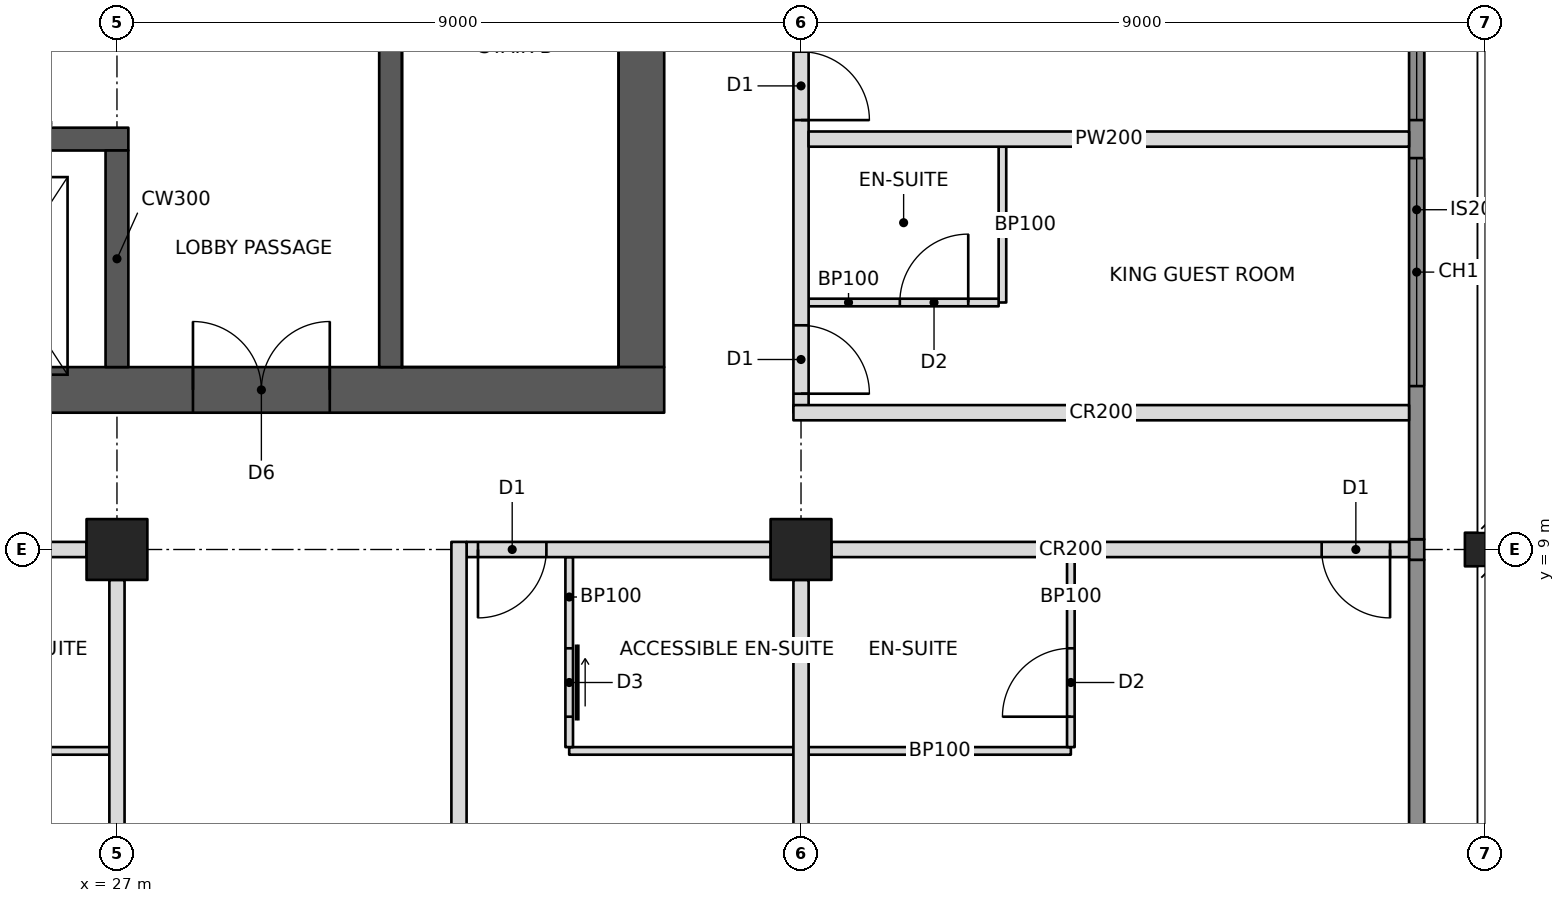
"""IFC4 building model, lengths in metres.
Left out: names, types, materials, properties, quantities, classifications, styles, units other than length and angle.
Written with IfcOpenShell. Run it as: python <this file> out.ifc"""

import sys

from ifc_helpers import new_model, si_unit, direction, frame, frame_2d, origin, origin_2d, place, context, subcontext, project, spatial, rectangle, hollow_rectangle, i_section, extrude, element, fill, save


model = new_model("IFC4")
c1 = context("Model", 3, precision=1e-05, world=origin(), true_north=direction((0.0, 1.0)))
c2 = subcontext(c1, "Body", "Model", "MODEL_VIEW")
j1 = project(units=[si_unit("LENGTHUNIT", "METRE"), si_unit("PLANEANGLEUNIT", "RADIAN")], contexts=[c1])
p1 = place(None, origin())
s1 = spatial("IfcSite", under=j1, at=p1, CompositionType="ELEMENT")
p2 = place(p1, origin())
s2 = spatial("IfcBuilding", under=s1, at=p2, CompositionType="ELEMENT")
p3 = place(p2, frame((0.0, 0.0, 124.8)))
s3 = spatial("IfcBuildingStorey", under=s2, at=p3, CompositionType="ELEMENT", Elevation=124.8)
for number, where, z_axis, x_axis in (
    (1, (27.0, 9.0, 0.0), (0.0, 0.0, 1.0), (1.0, 0.0, 0.0)),
    (2, (36.0, 9.0, 0.0), (0.0, 0.0, 1.0), (0.0, 1.0, 0.0)),
):
    element("IfcColumn", number, at=place(p3, frame(where, z_axis=z_axis, x_axis=x_axis)), inside=s3, PredefinedType="COLUMN", context=c2, shape_type="SweptSolid", body=[
        extrude(hollow_rectangle(XDim=0.8, YDim=0.8, WallThickness=0.07, at=origin_2d()), origin(), (0.0, 0.0, 1.0), 3.4),
    ])
p4 = place(p3, frame((45.0, 9.0, 0.0), z_axis=(0.0, 0.0, 1.0), x_axis=(0.0, 1.0, 0.0)))
e3 = element("IfcColumn", 3, at=p4, inside=s3, PredefinedType="COLUMN", context=c2, shape_type="SweptSolid", body=[
    extrude(i_section(OverallWidth=0.442, OverallDepth=0.531, WebThickness=0.066, FlangeThickness=0.106, at=origin_2d()), origin(), (0.0, 0.0, 1.0), 3.4),
])
p5 = place(p3, frame((10.8, 11.1, 0.0), z_axis=(0.0, 0.0, 1.0), x_axis=(1.0, 0.0, 0.0)))
e4 = element("IfcWall", 4, at=p5, inside=s3, PredefinedType="SHEAR", context=c2, shape_type="SweptSolid", body=[
    extrude(rectangle(XDim=23.4, YDim=0.6, at=frame_2d((11.7, 0.0))), origin(), (0.0, 0.0, 1.0), 3.4),
])
p6 = place(p5, frame((1.0, 0.0, 0.0)))
e5 = element("IfcOpeningElement", 5, at=p6, cuts=e4, PredefinedType="OPENING", context=c2, shape_type="SweptSolid", body=[
    extrude(rectangle(XDim=1.0, YDim=2.1, at=frame_2d((0.5, 1.05))), frame((0.0, 0.31, 0.0), z_axis=(0.0, -1.0, 0.0), x_axis=(1.0, 0.0, 0.0)), (0.0, 0.0, 1.0), 0.62),
])
p7 = place(p5, frame((17.2, 0.0, 0.0)))
e6 = element("IfcOpeningElement", 6, at=p7, cuts=e4, PredefinedType="OPENING", context=c2, shape_type="SweptSolid", body=[
    extrude(rectangle(XDim=1.8, YDim=2.1, at=frame_2d((0.9, 1.05))), frame((0.0, 0.31, 0.0), z_axis=(0.0, -1.0, 0.0), x_axis=(1.0, 0.0, 0.0)), (0.0, 0.0, 1.0), 0.62),
])
p8 = place(p3, frame((33.9, 11.4, 0.0), z_axis=(0.0, 0.0, 1.0), x_axis=(0.0, 1.0, 0.0)))
e7 = element("IfcWall", 7, at=p8, inside=s3, PredefinedType="SHEAR", context=c2, shape_type="SweptSolid", body=[
    extrude(rectangle(XDim=13.2, YDim=0.6, at=frame_2d((6.6, 0.0))), origin(), (0.0, 0.0, 1.0), 3.4),
])
p9 = place(p3, frame((18.15, 14.4, 0.0), z_axis=(0.0, 0.0, 1.0), x_axis=(1.0, 0.0, 0.0)))
e8 = element("IfcWall", 8, at=p9, inside=s3, PredefinedType="SHEAR", context=c2, shape_type="SweptSolid", body=[
    extrude(rectangle(XDim=9.0, YDim=0.3, at=frame_2d((4.5, 0.0))), origin(), (0.0, 0.0, 1.0), 3.4),
])
p10 = place(p9, frame((0.8, 0.0, 0.0)))
e9 = element("IfcOpeningElement", 9, at=p10, cuts=e8, PredefinedType="OPENING", context=c2, shape_type="SweptSolid", body=[
    extrude(rectangle(XDim=1.1, YDim=2.1, at=frame_2d((0.55, 1.05))), frame((0.0, 0.16, 0.0), z_axis=(0.0, -1.0, 0.0), x_axis=(1.0, 0.0, 0.0)), (0.0, 0.0, 1.0), 0.32),
])
p11 = place(p9, frame((3.8, 0.0, 0.0)))
e10 = element("IfcOpeningElement", 10, at=p11, cuts=e8, PredefinedType="OPENING", context=c2, shape_type="SweptSolid", body=[
    extrude(rectangle(XDim=1.1, YDim=2.1, at=frame_2d((0.55, 1.05))), frame((0.0, 0.16, 0.0), z_axis=(0.0, -1.0, 0.0), x_axis=(1.0, 0.0, 0.0)), (0.0, 0.0, 1.0), 0.32),
])
p12 = place(p9, frame((6.75, 0.0, 0.0)))
e11 = element("IfcOpeningElement", 11, at=p12, cuts=e8, PredefinedType="OPENING", context=c2, shape_type="SweptSolid", body=[
    extrude(rectangle(XDim=1.2, YDim=2.1, at=frame_2d((0.6, 1.05))), frame((0.0, 0.16, 0.0), z_axis=(0.0, -1.0, 0.0), x_axis=(1.0, 0.0, 0.0)), (0.0, 0.0, 1.0), 0.32),
])
p13 = place(p3, frame((27.0, 11.4, 0.0), z_axis=(0.0, 0.0, 1.0), x_axis=(0.0, 1.0, 0.0)))
e12 = element("IfcWall", 12, at=p13, inside=s3, PredefinedType="SHEAR", context=c2, shape_type="SweptSolid", body=[
    extrude(rectangle(XDim=2.85, YDim=0.3, at=frame_2d((1.425, 0.0))), origin(), (0.0, 0.0, 1.0), 3.4),
])
p14 = place(p3, frame((30.6, 11.4, 0.0), z_axis=(0.0, 0.0, 1.0), x_axis=(0.0, 1.0, 0.0)))
e13 = element("IfcWall", 13, at=p14, inside=s3, PredefinedType="SHEAR", context=c2, shape_type="SweptSolid", body=[
    extrude(rectangle(XDim=13.2, YDim=0.3, at=frame_2d((6.6, 0.0))), origin(), (0.0, 0.0, 1.0), 3.4),
])
p15 = place(p3, frame((18.4, 9.0, 0.0), z_axis=(0.0, 0.0, 1.0), x_axis=(1.0, 0.0, 0.0)))
e14 = element("IfcWall", 14, at=p15, inside=s3, PredefinedType="PARTITIONING", context=c2, shape_type="SweptSolid", body=[
    extrude(rectangle(XDim=8.2, YDim=0.2, at=frame_2d((4.1, 0.0))), origin(), (0.0, 0.0, 1.0), 2.405),
])
p16 = place(p15, frame((4.35, 0.0, 0.0)))
e15 = element("IfcOpeningElement", 15, at=p16, cuts=e14, PredefinedType="OPENING", context=c2, shape_type="SweptSolid", body=[
    extrude(rectangle(XDim=0.9, YDim=2.1, at=frame_2d((0.45, 1.05))), frame((0.0, 0.11, 0.0), z_axis=(0.0, -1.0, 0.0), x_axis=(1.0, 0.0, 0.0)), (0.0, 0.0, 1.0), 0.22),
])
p17 = place(p3, frame((31.6, 9.0, 0.0), z_axis=(0.0, 0.0, 1.0), x_axis=(1.0, 0.0, 0.0)))
e16 = element("IfcWall", 16, at=p17, inside=s3, PredefinedType="PARTITIONING", context=c2, shape_type="SweptSolid", body=[
    extrude(rectangle(XDim=4.0, YDim=0.2, at=frame_2d((2.0, 0.0))), origin(), (0.0, 0.0, 1.0), 2.405),
])
p18 = place(p17, frame((0.15, 0.0, 0.0)))
e17 = element("IfcOpeningElement", 17, at=p18, cuts=e16, PredefinedType="OPENING", context=c2, shape_type="SweptSolid", body=[
    extrude(rectangle(XDim=0.9, YDim=2.1, at=frame_2d((0.45, 1.05))), frame((0.0, 0.11, 0.0), z_axis=(0.0, -1.0, 0.0), x_axis=(1.0, 0.0, 0.0)), (0.0, 0.0, 1.0), 0.22),
])
p19 = place(p3, frame((36.4, 9.0, 0.0), z_axis=(0.0, 0.0, 1.0), x_axis=(1.0, 0.0, 0.0)))
e18 = element("IfcWall", 18, at=p19, inside=s3, PredefinedType="PARTITIONING", context=c2, shape_type="SweptSolid", body=[
    extrude(rectangle(XDim=7.6, YDim=0.2, at=frame_2d((3.8, 0.0))), origin(), (0.0, 0.0, 1.0), 2.438),
])
p20 = place(p19, frame((6.45, 0.0, 0.0)))
e19 = element("IfcOpeningElement", 19, at=p20, cuts=e18, PredefinedType="OPENING", context=c2, shape_type="SweptSolid", body=[
    extrude(rectangle(XDim=0.9, YDim=2.1, at=frame_2d((0.45, 1.05))), frame((0.0, 0.11, 0.0), z_axis=(0.0, -1.0, 0.0), x_axis=(1.0, 0.0, 0.0)), (0.0, 0.0, 1.0), 0.22),
])
p21 = place(p3, frame((36.0, 10.8, 0.0), z_axis=(0.0, 0.0, 1.0), x_axis=(0.0, 1.0, 0.0)))
e20 = element("IfcWall", 20, at=p21, inside=s3, PredefinedType="PARTITIONING", context=c2, shape_type="SweptSolid", body=[
    extrude(rectangle(XDim=6.8, YDim=0.2, at=frame_2d((3.4, 0.0))), origin(), (0.0, 0.0, 1.0), 2.405),
])
p22 = place(p21, frame((0.25, 0.0, 0.0)))
e21 = element("IfcOpeningElement", 21, at=p22, cuts=e20, PredefinedType="OPENING", context=c2, shape_type="SweptSolid", body=[
    extrude(rectangle(XDim=0.9, YDim=2.1, at=frame_2d((0.45, 1.05))), frame((0.0, 0.11, 0.0), z_axis=(0.0, -1.0, 0.0), x_axis=(1.0, 0.0, 0.0)), (0.0, 0.0, 1.0), 0.22),
])
p23 = place(p21, frame((3.85, 0.0, 0.0)))
e22 = element("IfcOpeningElement", 22, at=p23, cuts=e20, PredefinedType="OPENING", context=c2, shape_type="SweptSolid", body=[
    extrude(rectangle(XDim=0.9, YDim=2.1, at=frame_2d((0.45, 1.05))), frame((0.0, 0.11, 0.0), z_axis=(0.0, -1.0, 0.0), x_axis=(1.0, 0.0, 0.0)), (0.0, 0.0, 1.0), 0.22),
])
p24 = place(p3, frame((35.9, 10.8, 0.0), z_axis=(0.0, 0.0, 1.0), x_axis=(1.0, 0.0, 0.0)))
e23 = element("IfcWall", 23, at=p24, inside=s3, PredefinedType="PARTITIONING", context=c2, shape_type="SweptSolid", body=[
    extrude(rectangle(XDim=8.1, YDim=0.2, at=frame_2d((4.05, 0.0))), origin(), (0.0, 0.0, 1.0), 2.404),
])
p25 = place(p3, frame((27.0, 8.6, 0.0), z_axis=(0.0, 0.0, 1.0), x_axis=(0.0, -1.0, 0.0)))
e24 = element("IfcWall", 24, at=p25, inside=s3, PredefinedType="PARTITIONING", context=c2, shape_type="SweptSolid", body=[
    extrude(rectangle(XDim=7.6, YDim=0.2, at=frame_2d((3.8, 0.0))), origin(), (0.0, 0.0, 1.0), 2.405),
])
p26 = place(p3, frame((31.5, 9.1, 0.0), z_axis=(0.0, 0.0, 1.0), x_axis=(0.0, -1.0, 0.0)))
e25 = element("IfcWall", 25, at=p26, inside=s3, PredefinedType="PARTITIONING", context=c2, shape_type="SweptSolid", body=[
    extrude(rectangle(XDim=8.1, YDim=0.2, at=frame_2d((4.05, 0.0))), origin(), (0.0, 0.0, 1.0), 2.404),
])
p27 = place(p3, frame((36.0, 8.6, 0.0), z_axis=(0.0, 0.0, 1.0), x_axis=(0.0, -1.0, 0.0)))
e26 = element("IfcWall", 26, at=p27, inside=s3, PredefinedType="PARTITIONING", context=c2, shape_type="SweptSolid", body=[
    extrude(rectangle(XDim=7.6, YDim=0.2, at=frame_2d((3.8, 0.0))), origin(), (0.0, 0.0, 1.0), 2.438),
])
p28 = place(p3, frame((23.95, 6.35, 0.0), z_axis=(0.0, 0.0, 1.0), x_axis=(1.0, 0.0, 0.0)))
e27 = element("IfcWall", 27, at=p28, inside=s3, PredefinedType="PARTITIONING", context=c2, shape_type="SweptSolid", body=[
    extrude(rectangle(XDim=2.95, YDim=0.1, at=frame_2d((1.475, 0.0))), origin(), (0.0, 0.0, 1.0), 2.404),
])
p29 = place(p3, frame((32.95, 6.35, 0.0), z_axis=(0.0, 0.0, 1.0), x_axis=(1.0, 0.0, 0.0)))
e28 = element("IfcWall", 28, at=p29, inside=s3, PredefinedType="PARTITIONING", context=c2, shape_type="SweptSolid", body=[
    extrude(rectangle(XDim=2.95, YDim=0.1, at=frame_2d((1.475, 0.0))), origin(), (0.0, 0.0, 1.0), 2.438),
])
p30 = place(p3, frame((32.95, 8.9, 0.0), z_axis=(0.0, 0.0, 1.0), x_axis=(0.0, -1.0, 0.0)))
e29 = element("IfcWall", 29, at=p30, inside=s3, PredefinedType="PARTITIONING", context=c2, shape_type="SweptSolid", body=[
    extrude(rectangle(XDim=2.5, YDim=0.1, at=frame_2d((1.25, 0.0))), origin(), (0.0, 0.0, 1.0), 2.404),
])
p31 = place(p30, frame((1.2, 0.0, 0.0)))
e30 = element("IfcOpeningElement", 30, at=p31, cuts=e29, PredefinedType="OPENING", context=c2, shape_type="SweptSolid", body=[
    extrude(rectangle(XDim=0.9, YDim=2.1, at=frame_2d((0.45, 1.05))), frame((0.0, 0.06, 0.0), z_axis=(0.0, -1.0, 0.0), x_axis=(1.0, 0.0, 0.0)), (0.0, 0.0, 1.0), 0.12),
])
p32 = place(p3, frame((36.1, 6.35, 0.0), z_axis=(0.0, 0.0, 1.0), x_axis=(1.0, 0.0, 0.0)))
e31 = element("IfcWall", 31, at=p32, inside=s3, PredefinedType="PARTITIONING", context=c2, shape_type="SweptSolid", body=[
    extrude(rectangle(XDim=3.45, YDim=0.1, at=frame_2d((1.725, 0.0))), origin(), (0.0, 0.0, 1.0), 2.438),
])
p33 = place(p3, frame((39.55, 8.9, 0.0), z_axis=(0.0, 0.0, 1.0), x_axis=(0.0, -1.0, 0.0)))
e32 = element("IfcWall", 32, at=p33, inside=s3, PredefinedType="PARTITIONING", context=c2, shape_type="SweptSolid", body=[
    extrude(rectangle(XDim=2.5, YDim=0.1, at=frame_2d((1.25, 0.0))), origin(), (0.0, 0.0, 1.0), 2.438),
])
p34 = place(p33, frame((1.2, 0.0, 0.0)))
e33 = element("IfcOpeningElement", 33, at=p34, cuts=e32, PredefinedType="OPENING", context=c2, shape_type="SweptSolid", body=[
    extrude(rectangle(XDim=0.9, YDim=2.1, at=frame_2d((0.45, 1.05))), frame((0.0, 0.06, 0.0), z_axis=(0.0, -1.0, 0.0), x_axis=(1.0, 0.0, 0.0)), (0.0, 0.0, 1.0), 0.12),
])
p35 = place(p3, frame((36.1, 14.4, 0.0), z_axis=(0.0, 0.0, 1.0), x_axis=(1.0, 0.0, 0.0)))
e34 = element("IfcWall", 34, at=p35, inside=s3, PredefinedType="PARTITIONING", context=c2, shape_type="SweptSolid", body=[
    extrude(rectangle(XDim=7.9, YDim=0.2, at=frame_2d((3.95, 0.0))), origin(), (0.0, 0.0, 1.0), 2.404),
])
p36 = place(p3, frame((38.65, 12.25, 0.0), z_axis=(0.0, 0.0, 1.0), x_axis=(0.0, 1.0, 0.0)))
e35 = element("IfcWall", 35, at=p36, inside=s3, PredefinedType="PARTITIONING", context=c2, shape_type="SweptSolid", body=[
    extrude(rectangle(XDim=2.05, YDim=0.1, at=frame_2d((1.025, 0.0))), origin(), (0.0, 0.0, 1.0), 3.2),
])
p37 = place(p3, frame((36.1, 12.25, 0.0), z_axis=(0.0, 0.0, 1.0), x_axis=(1.0, 0.0, 0.0)))
e36 = element("IfcWall", 36, at=p37, inside=s3, PredefinedType="PARTITIONING", context=c2, shape_type="SweptSolid", body=[
    extrude(rectangle(XDim=2.5, YDim=0.1, at=frame_2d((1.25, 0.0))), origin(), (0.0, 0.0, 1.0), 2.404),
])
p38 = place(p37, frame((1.2, 0.0, 0.0)))
e37 = element("IfcOpeningElement", 37, at=p38, cuts=e36, PredefinedType="OPENING", context=c2, shape_type="SweptSolid", body=[
    extrude(rectangle(XDim=0.9, YDim=2.1, at=frame_2d((0.45, 1.05))), frame((0.0, 0.06, 0.0), z_axis=(0.0, -1.0, 0.0), x_axis=(1.0, 0.0, 0.0)), (0.0, 0.0, 1.0), 0.12),
])
p39 = place(p3, frame((44.1, 4.607, 0.0), z_axis=(0.0, 0.0, 1.0), x_axis=(0.0, 1.0, 0.0)))
e38 = element("IfcWall", 38, at=p39, inside=s3, PredefinedType="SOLIDWALL", context=c2, shape_type="SweptSolid", body=[
    extrude(rectangle(XDim=4.257, YDim=0.2, at=frame_2d((2.129, 0.0))), origin(), (0.0, 0.0, 1.0), 3.2),
])
p40 = place(p3, frame((44.1, 8.865, 0.0), z_axis=(0.0, 0.0, 1.0), x_axis=(0.0, 1.0, 0.0)))
e39 = element("IfcWall", 39, at=p40, inside=s3, PredefinedType="SOLIDWALL", context=c2, shape_type="SweptSolid", body=[
    extrude(rectangle(XDim=0.271, YDim=0.2, at=frame_2d((0.135, 0.0))), origin(), (0.0, 0.0, 1.0), 2.438),
])
p41 = place(p3, frame((44.1, 9.135, 0.0), z_axis=(0.0, 0.0, 1.0), x_axis=(0.0, 1.0, 0.0)))
e40 = element("IfcWall", 40, at=p41, inside=s3, PredefinedType="SOLIDWALL", context=c2, shape_type="SweptSolid", body=[
    extrude(rectangle(XDim=8.671, YDim=0.2, at=frame_2d((4.335, 0.0))), origin(), (0.0, 0.0, 1.0), 3.2),
])
p42 = place(p41, frame((2.015, 0.0, 0.6)))
e41 = element("IfcOpeningElement", 41, at=p42, cuts=e40, PredefinedType="OPENING", context=c2, shape_type="SweptSolid", body=[
    extrude(rectangle(XDim=3.0, YDim=2.2, at=frame_2d((1.5, 1.1))), frame((0.0, 0.11, 0.0), z_axis=(0.0, -1.0, 0.0), x_axis=(1.0, 0.0, 0.0)), (0.0, 0.0, 1.0), 0.22),
])
p43 = place(p41, frame((5.515, 0.0, 0.6)))
e42 = element("IfcOpeningElement", 42, at=p43, cuts=e40, PredefinedType="OPENING", context=c2, shape_type="SweptSolid", body=[
    extrude(rectangle(XDim=3.0, YDim=2.2, at=frame_2d((1.5, 1.1))), frame((0.0, 0.11, 0.0), z_axis=(0.0, -1.0, 0.0), x_axis=(1.0, 0.0, 0.0)), (0.0, 0.0, 1.0), 0.22),
])
p44 = place(p42, origin())
e43 = element("IfcWindow", 43, at=p44, inside=s3, PartitioningType="TRIPLE_PANEL_VERTICAL", PredefinedType="WINDOW", context=c2, shape_type="SweptSolid", body=[
    extrude(rectangle(XDim=3.0, YDim=2.2, at=frame_2d((1.5, 1.1))), frame((0.0, 0.03, 0.0), z_axis=(0.0, -1.0, 0.0), x_axis=(1.0, 0.0, 0.0)), (0.0, 0.0, 1.0), 0.06),
])
fill(e41, e43)
p45 = place(p43, origin())
e44 = element("IfcWindow", 44, at=p45, inside=s3, PartitioningType="TRIPLE_PANEL_VERTICAL", PredefinedType="WINDOW", context=c2, shape_type="SweptSolid", body=[
    extrude(rectangle(XDim=3.0, YDim=2.2, at=frame_2d((1.5, 1.1))), frame((0.0, 0.03, 0.0), z_axis=(0.0, -1.0, 0.0), x_axis=(1.0, 0.0, 0.0)), (0.0, 0.0, 1.0), 0.06),
])
fill(e42, e44)
p46 = place(p31, origin())
e45 = element("IfcDoor", 45, at=p46, inside=s3, OperationType="SLIDING_TO_LEFT", PredefinedType="DOOR", context=c2, shape_type="SweptSolid", body=[
    extrude(rectangle(XDim=0.9, YDim=2.1, at=frame_2d((0.45, 1.05))), frame((0.0, 0.025, 0.0), z_axis=(0.0, -1.0, 0.0), x_axis=(1.0, 0.0, 0.0)), (0.0, 0.0, 1.0), 0.05),
])
fill(e30, e45)
p47 = place(p18, frame((0.9, 0.0, 0.0), z_axis=(0.0, 0.0, 1.0), x_axis=(-1.0, 0.0, 0.0)))
e46 = element("IfcDoor", 46, at=p47, inside=s3, OperationType="SINGLE_SWING_RIGHT", PredefinedType="DOOR", context=c2, shape_type="SweptSolid", body=[
    extrude(rectangle(XDim=0.9, YDim=2.1, at=frame_2d((0.45, 1.05))), frame((0.0, 0.025, 0.0), z_axis=(0.0, -1.0, 0.0), x_axis=(1.0, 0.0, 0.0)), (0.0, 0.0, 1.0), 0.05),
])
fill(e17, e46)
p48 = place(p34, frame((0.9, 0.0, 0.0), z_axis=(0.0, 0.0, 1.0), x_axis=(-1.0, 0.0, 0.0)))
e47 = element("IfcDoor", 47, at=p48, inside=s3, OperationType="SINGLE_SWING_LEFT", PredefinedType="DOOR", context=c2, shape_type="SweptSolid", body=[
    extrude(rectangle(XDim=0.9, YDim=2.1, at=frame_2d((0.45, 1.05))), frame((0.0, 0.025, 0.0), z_axis=(0.0, -1.0, 0.0), x_axis=(1.0, 0.0, 0.0)), (0.0, 0.0, 1.0), 0.05),
])
fill(e33, e47)
p49 = place(p20, frame((0.9, 0.0, 0.0), z_axis=(0.0, 0.0, 1.0), x_axis=(-1.0, 0.0, 0.0)))
e48 = element("IfcDoor", 48, at=p49, inside=s3, OperationType="SINGLE_SWING_LEFT", PredefinedType="DOOR", context=c2, shape_type="SweptSolid", body=[
    extrude(rectangle(XDim=0.9, YDim=2.1, at=frame_2d((0.45, 1.05))), frame((0.0, 0.025, 0.0), z_axis=(0.0, -1.0, 0.0), x_axis=(1.0, 0.0, 0.0)), (0.0, 0.0, 1.0), 0.05),
])
fill(e19, e48)
p50 = place(p38, origin())
e49 = element("IfcDoor", 49, at=p50, inside=s3, OperationType="SINGLE_SWING_RIGHT", PredefinedType="DOOR", context=c2, shape_type="SweptSolid", body=[
    extrude(rectangle(XDim=0.9, YDim=2.1, at=frame_2d((0.45, 1.05))), frame((0.0, 0.025, 0.0), z_axis=(0.0, -1.0, 0.0), x_axis=(1.0, 0.0, 0.0)), (0.0, 0.0, 1.0), 0.05),
])
fill(e37, e49)
p51 = place(p22, frame((0.9, 0.0, 0.0), z_axis=(0.0, 0.0, 1.0), x_axis=(-1.0, 0.0, 0.0)))
e50 = element("IfcDoor", 50, at=p51, inside=s3, OperationType="SINGLE_SWING_RIGHT", PredefinedType="DOOR", context=c2, shape_type="SweptSolid", body=[
    extrude(rectangle(XDim=0.9, YDim=2.1, at=frame_2d((0.45, 1.05))), frame((0.0, 0.025, 0.0), z_axis=(0.0, -1.0, 0.0), x_axis=(1.0, 0.0, 0.0)), (0.0, 0.0, 1.0), 0.05),
])
fill(e21, e50)
p52 = place(p23, frame((0.9, 0.0, 0.0), z_axis=(0.0, 0.0, 1.0), x_axis=(-1.0, 0.0, 0.0)))
e51 = element("IfcDoor", 51, at=p52, inside=s3, OperationType="SINGLE_SWING_RIGHT", PredefinedType="DOOR", context=c2, shape_type="SweptSolid", body=[
    extrude(rectangle(XDim=0.9, YDim=2.1, at=frame_2d((0.45, 1.05))), frame((0.0, 0.025, 0.0), z_axis=(0.0, -1.0, 0.0), x_axis=(1.0, 0.0, 0.0)), (0.0, 0.0, 1.0), 0.05),
])
fill(e22, e51)
p53 = place(p7, origin())
e52 = element("IfcDoor", 52, at=p53, inside=s3, OperationType="DOUBLE_DOOR_SINGLE_SWING", PredefinedType="DOOR", context=c2, shape_type="SweptSolid", body=[
    extrude(rectangle(XDim=1.8, YDim=2.1, at=frame_2d((0.9, 1.05))), frame((0.0, 0.025, 0.0), z_axis=(0.0, -1.0, 0.0), x_axis=(1.0, 0.0, 0.0)), (0.0, 0.0, 1.0), 0.05),
])
fill(e6, e52)
save(model, sys.argv[1])
